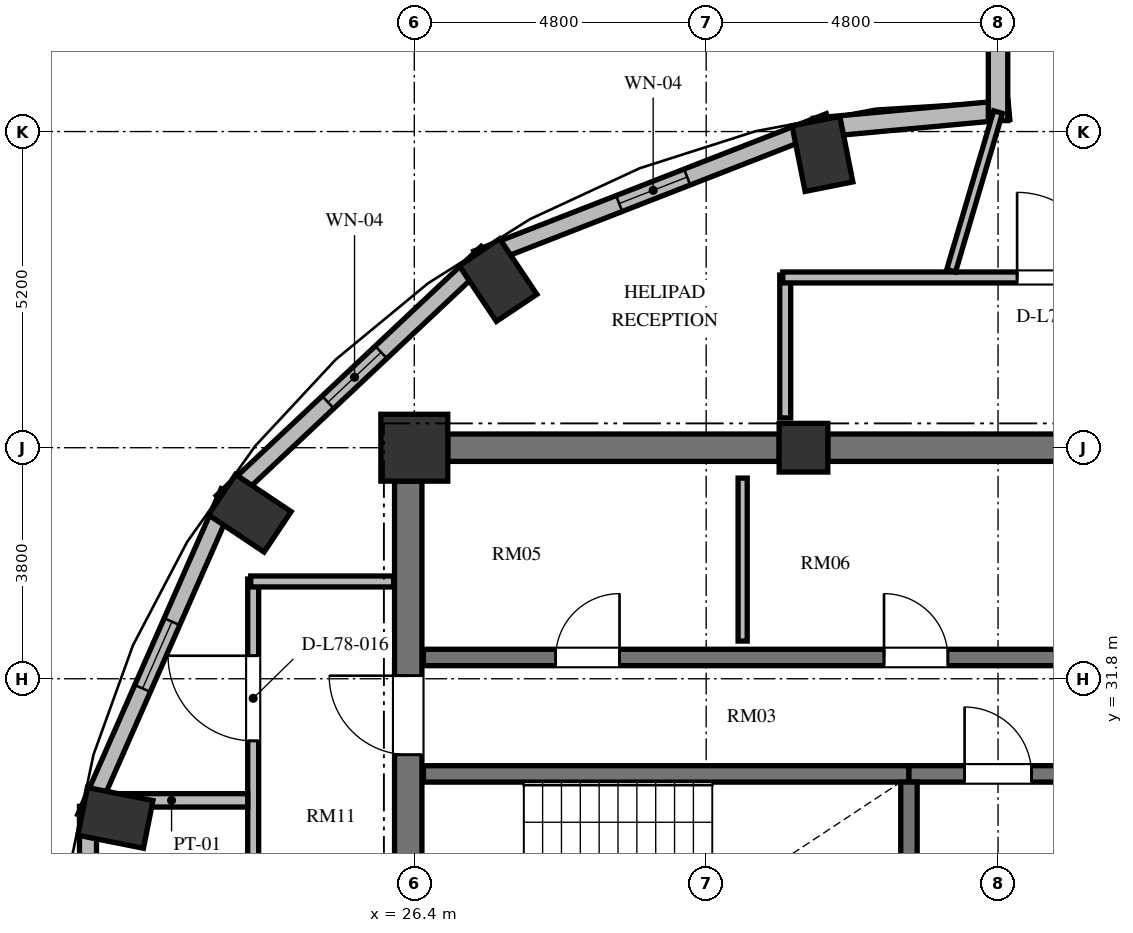
"""IFC4 building model, lengths in metres.
Left out: names, types, materials, properties, quantities, classifications, styles, units other than length and angle.
Written with IfcOpenShell. Run it as: python <this file> out.ifc"""

import sys

from ifc_helpers import new_model, si_unit, direction, frame, frame_2d, origin, origin_2d, place, context, subcontext, project, spatial, rectangle, extrude, element, fill, save


model = new_model("IFC4")
c1 = context("Model", 3, precision=1e-05, world=origin(), true_north=direction((0.0, 1.0)))
c2 = subcontext(c1, "Body", "Model", "MODEL_VIEW")
j1 = project(units=[si_unit("LENGTHUNIT", "METRE"), si_unit("PLANEANGLEUNIT", "RADIAN")], contexts=[c1])
p1 = place(None, origin())
s1 = spatial("IfcSite", under=j1, at=p1, CompositionType="ELEMENT")
p2 = place(p1, origin())
s2 = spatial("IfcBuilding", under=s1, at=p2, CompositionType="ELEMENT")
p3 = place(p2, frame((0.0, 0.0, 298.8)))
s3 = spatial("IfcBuildingStorey", under=s2, at=p3, CompositionType="ELEMENT", Elevation=298.8)
for number, where, z_axis, x_axis in (
    (1, (33.113, 40.433, 0.0), (0.0, 0.0, 1.0), (-0.195, 0.981, 0.0)),
    (2, (27.778, 38.357, 0.0), (0.0, 0.0, 1.0), (-0.556, 0.831, 0.0)),
    (3, (23.694, 34.522, 0.0), (0.0, 0.0, 1.0), (-0.831, 0.556, 0.0)),
    (4, (21.484, 29.512, 0.0), (0.0, 0.0, 1.0), (-0.981, 0.195, 0.0)),
):
    element("IfcColumn", number, at=place(p3, frame(where, z_axis=z_axis, x_axis=x_axis)), inside=s3, PredefinedType="COLUMN", context=c2, shape_type="SweptSolid", body=[
        extrude(rectangle(XDim=1.1, YDim=0.8, at=origin_2d()), origin(), (0.0, 0.0, 1.0), 3.648),
    ])
p4 = place(p3, frame((32.8, 35.6, 0.0), z_axis=(0.0, 0.0, 1.0), x_axis=(1.0, 0.0, 0.0)))
e5 = element("IfcColumn", 5, at=p4, inside=s3, PredefinedType="COLUMN", context=c2, shape_type="SweptSolid", body=[
    extrude(rectangle(XDim=0.8, YDim=0.8, at=origin_2d()), origin(), (0.0, 0.0, 1.0), 3.648),
])
p5 = place(p3, frame((26.4, 35.6, 0.0), z_axis=(0.0, 0.0, 1.0), x_axis=(1.0, 0.0, 0.0)))
e6 = element("IfcColumn", 6, at=p5, inside=s3, PredefinedType="COLUMN", context=c2, shape_type="SweptSolid", body=[
    extrude(rectangle(XDim=1.1, YDim=1.1, at=origin_2d()), origin(), (0.0, 0.0, 1.0), 3.648),
])
p6 = place(p3, frame((26.3, 20.95, 0.0), z_axis=(0.0, 0.0, 1.0), x_axis=(0.0, 1.0, 0.0)))
e7 = element("IfcWall", 7, at=p6, inside=s3, PredefinedType="SHEAR", context=c2, shape_type="SweptSolid", body=[
    extrude(rectangle(XDim=14.1, YDim=0.45, at=frame_2d((7.05, 0.0))), origin(), (0.0, 0.0, 1.0), 3.648),
])
p7 = place(p6, frame((6.5, 0.0, 0.0)))
e8 = element("IfcOpeningElement", 8, at=p7, cuts=e7, PredefinedType="OPENING", context=c2, shape_type="SweptSolid", body=[
    extrude(rectangle(XDim=1.2, YDim=2.15, at=frame_2d((0.6, 1.075))), frame((0.0, 0.235, 0.0), z_axis=(0.0, -1.0, 0.0), x_axis=(1.0, 0.0, 0.0)), (0.0, 0.0, 1.0), 0.47),
])
p8 = place(p6, frame((9.6, 0.0, 0.0)))
e9 = element("IfcOpeningElement", 9, at=p8, cuts=e7, PredefinedType="OPENING", context=c2, shape_type="SweptSolid", body=[
    extrude(rectangle(XDim=1.3, YDim=2.2, at=frame_2d((0.65, 1.1))), frame((0.0, 0.235, 0.0), z_axis=(0.0, -1.0, 0.0), x_axis=(1.0, 0.0, 0.0)), (0.0, 0.0, 1.0), 0.47),
])
p9 = place(p6, frame((3.26, 0.0, 0.0)))
e10 = element("IfcOpeningElement", 10, at=p9, cuts=e7, PredefinedType="OPENING", context=c2, shape_type="SweptSolid", body=[
    extrude(rectangle(XDim=1.3, YDim=2.2, at=frame_2d((0.65, 1.1))), frame((0.0, 0.235, 0.0), z_axis=(0.0, -1.0, 0.0), x_axis=(1.0, 0.0, 0.0)), (0.0, 0.0, 1.0), 0.47),
])
p10 = place(p3, frame((26.95, 35.6, 0.0), z_axis=(0.0, 0.0, 1.0), x_axis=(1.0, 0.0, 0.0)))
e11 = element("IfcWall", 11, at=p10, inside=s3, PredefinedType="SHEAR", context=c2, shape_type="SweptSolid", body=[
    extrude(rectangle(XDim=5.45, YDim=0.45, at=frame_2d((2.725, 0.0))), origin(), (0.0, 0.0, 1.0), 3.648),
])
p11 = place(p3, frame((33.2, 35.6, 0.0), z_axis=(0.0, 0.0, 1.0), x_axis=(1.0, 0.0, 0.0)))
e12 = element("IfcWall", 12, at=p11, inside=s3, PredefinedType="SHEAR", context=c2, shape_type="SweptSolid", body=[
    extrude(rectangle(XDim=5.6, YDim=0.45, at=frame_2d((2.8, 0.0))), origin(), (0.0, 0.0, 1.0), 3.648),
])
p12 = place(p3, frame((33.228, 40.964, 0.0), z_axis=(0.0, 0.0, 1.0), x_axis=(-0.931716550814, -0.36318627306, 0.0)))
e13 = element("IfcWall", 13, at=p12, inside=s3, PredefinedType="SOLIDWALL", context=c2, shape_type="SweptSolid", body=[
    extrude(rectangle(XDim=6.224, YDim=0.28, at=frame_2d((3.112, 0.0))), origin(), (0.0, 0.0, 1.0), 3.328),
])
p13 = place(p12, frame((2.512, 0.0, 0.85)))
e14 = element("IfcOpeningElement", 14, at=p13, cuts=e13, PredefinedType="OPENING", context=c2, shape_type="SweptSolid", body=[
    extrude(rectangle(XDim=1.2, YDim=1.8, at=frame_2d((0.6, 0.9))), frame((0.0, 0.15, 0.0), z_axis=(0.0, -1.0, 0.0), x_axis=(1.0, 0.0, 0.0)), (0.0, 0.0, 1.0), 0.3),
])
p14 = place(p3, frame((27.595, 38.808, 0.0), z_axis=(0.0, 0.0, 1.0), x_axis=(-0.728251519923, -0.685309947199, 0.0)))
e15 = element("IfcWall", 15, at=p14, inside=s3, PredefinedType="SOLIDWALL", context=c2, shape_type="SweptSolid", body=[
    extrude(rectangle(XDim=5.981, YDim=0.28, at=frame_2d((2.99, 0.0))), origin(), (0.0, 0.0, 1.0), 3.328),
])
p15 = place(p14, frame((2.391, 0.0, 0.85)))
e16 = element("IfcOpeningElement", 16, at=p15, cuts=e15, PredefinedType="OPENING", context=c2, shape_type="SweptSolid", body=[
    extrude(rectangle(XDim=1.2, YDim=1.8, at=frame_2d((0.6, 0.9))), frame((0.0, 0.15, 0.0), z_axis=(0.0, -1.0, 0.0), x_axis=(1.0, 0.0, 0.0)), (0.0, 0.0, 1.0), 0.3),
])
p16 = place(p3, frame((23.352, 34.869, 0.0), z_axis=(0.0, 0.0, 1.0), x_axis=(-0.402882523888, -0.915251698685, 0.0)))
e17 = element("IfcWall", 17, at=p16, inside=s3, PredefinedType="SOLIDWALL", context=c2, shape_type="SweptSolid", body=[
    extrude(rectangle(XDim=5.856, YDim=0.28, at=frame_2d((2.928, 0.0))), origin(), (0.0, 0.0, 1.0), 3.328),
])
p17 = place(p16, frame((2.328, 0.0, 0.85)))
e18 = element("IfcOpeningElement", 18, at=p17, cuts=e17, PredefinedType="OPENING", context=c2, shape_type="SweptSolid", body=[
    extrude(rectangle(XDim=1.2, YDim=1.8, at=frame_2d((0.6, 0.9))), frame((0.0, 0.15, 0.0), z_axis=(0.0, -1.0, 0.0), x_axis=(1.0, 0.0, 0.0)), (0.0, 0.0, 1.0), 0.3),
])
p18 = place(p3, frame((21.033, 29.701, 0.0), z_axis=(0.0, 0.0, 1.0), x_axis=(0.0, -1.0, 0.0)))
e19 = element("IfcWall", 19, at=p18, inside=s3, PredefinedType="SOLIDWALL", context=c2, shape_type="SweptSolid", body=[
    extrude(rectangle(XDim=5.803, YDim=0.28, at=frame_2d((2.901, 0.0))), origin(), (0.0, 0.0, 1.0), 3.328),
])
p19 = place(p18, frame((2.302, 0.0, 0.85)))
e20 = element("IfcOpeningElement", 20, at=p19, cuts=e19, PredefinedType="OPENING", context=c2, shape_type="SweptSolid", body=[
    extrude(rectangle(XDim=1.2, YDim=1.8, at=frame_2d((0.6, 0.9))), frame((0.0, 0.15, 0.0), z_axis=(0.0, -1.0, 0.0), x_axis=(1.0, 0.0, 0.0)), (0.0, 0.0, 1.0), 0.3),
])
p20 = place(p3, frame((36.179, 41.156, 0.0), z_axis=(0.0, 0.0, 1.0), x_axis=(-0.995736155144, -0.092247001792, 0.0)))
e21 = element("IfcWall", 21, at=p20, inside=s3, PredefinedType="SOLIDWALL", context=c2, shape_type="SweptSolid", body=[
    extrude(rectangle(XDim=3.216, YDim=0.32, at=frame_2d((1.608, 0.0))), origin(), (0.0, 0.0, 1.0), 2.413),
])
p21 = place(p3, frame((36.0, 45.5, 0.0), z_axis=(0.0, 0.0, 1.0), x_axis=(0.0, -1.0, 0.0)))
e22 = element("IfcWall", 22, at=p21, inside=s3, PredefinedType="SOLIDWALL", context=c2, shape_type="SweptSolid", body=[
    extrude(rectangle(XDim=4.52, YDim=0.32, at=frame_2d((2.26, 0.0))), origin(), (0.0, 0.0, 1.0), 3.328),
])
p22 = place(p3, frame((26.55, 30.235, 0.0), z_axis=(0.0, 0.0, 1.0), x_axis=(1.0, 0.0, 0.0)))
e23 = element("IfcWall", 23, at=p22, inside=s3, PredefinedType="SHEAR", context=c2, shape_type="SweptSolid", body=[
    extrude(rectangle(XDim=7.985, YDim=0.27, at=frame_2d((3.992, 0.0))), origin(), (0.0, 0.0, 1.0), 3.648),
])
p23 = place(p3, frame((34.535, 30.235, 0.0), z_axis=(0.0, 0.0, 1.0), x_axis=(1.0, 0.0, 0.0)))
e24 = element("IfcWall", 24, at=p23, inside=s3, PredefinedType="SHEAR", context=c2, shape_type="SweptSolid", body=[
    extrude(rectangle(XDim=2.93, YDim=0.27, at=frame_2d((1.465, 0.0))), origin(), (0.0, 0.0, 1.0), 3.648),
])
p24 = place(p23, frame((0.915, 0.0, 0.0)))
e25 = element("IfcOpeningElement", 25, at=p24, cuts=e24, PredefinedType="OPENING", context=c2, shape_type="SweptSolid", body=[
    extrude(rectangle(XDim=1.1, YDim=2.15, at=frame_2d((0.55, 1.075))), frame((0.0, 0.145, 0.0), z_axis=(0.0, -1.0, 0.0), x_axis=(1.0, 0.0, 0.0)), (0.0, 0.0, 1.0), 0.29),
])
p25 = place(p3, frame((34.535, 26.02, 0.0), z_axis=(0.0, 0.0, 1.0), x_axis=(0.0, 1.0, 0.0)))
e26 = element("IfcWall", 26, at=p25, inside=s3, PredefinedType="SHEAR", context=c2, shape_type="SweptSolid", body=[
    extrude(rectangle(XDim=4.08, YDim=0.27, at=frame_2d((2.04, 0.0))), origin(), (0.0, 0.0, 1.0), 3.648),
])
p26 = place(p3, frame((26.55, 32.15, 0.0), z_axis=(0.0, 0.0, 1.0), x_axis=(1.0, 0.0, 0.0)))
e27 = element("IfcWall", 27, at=p26, inside=s3, PredefinedType="SHEAR", context=c2, shape_type="SweptSolid", body=[
    extrude(rectangle(XDim=16.4, YDim=0.27, at=frame_2d((8.2, 0.0))), origin(), (0.0, 0.0, 1.0), 3.648),
])
p27 = place(p26, frame((2.175, 0.0, 0.0)))
e28 = element("IfcOpeningElement", 28, at=p27, cuts=e27, PredefinedType="OPENING", context=c2, shape_type="SweptSolid", body=[
    extrude(rectangle(XDim=1.05, YDim=2.15, at=frame_2d((0.525, 1.075))), frame((0.0, 0.145, 0.0), z_axis=(0.0, -1.0, 0.0), x_axis=(1.0, 0.0, 0.0)), (0.0, 0.0, 1.0), 0.29),
])
p28 = place(p26, frame((7.575, 0.0, 0.0)))
e29 = element("IfcOpeningElement", 29, at=p28, cuts=e27, PredefinedType="OPENING", context=c2, shape_type="SweptSolid", body=[
    extrude(rectangle(XDim=1.05, YDim=2.15, at=frame_2d((0.525, 1.075))), frame((0.0, 0.145, 0.0), z_axis=(0.0, -1.0, 0.0), x_axis=(1.0, 0.0, 0.0)), (0.0, 0.0, 1.0), 0.29),
])
p29 = place(p26, frame((11.9, 0.0, 0.0)))
e30 = element("IfcOpeningElement", 30, at=p29, cuts=e27, PredefinedType="OPENING", context=c2, shape_type="SweptSolid", body=[
    extrude(rectangle(XDim=1.1, YDim=2.2, at=frame_2d((0.55, 1.1))), frame((0.0, 0.145, 0.0), z_axis=(0.0, -1.0, 0.0), x_axis=(1.0, 0.0, 0.0)), (0.0, 0.0, 1.0), 0.29),
])
p30 = place(p26, frame((14.5, 0.0, 0.0)))
e31 = element("IfcOpeningElement", 31, at=p30, cuts=e27, PredefinedType="OPENING", context=c2, shape_type="SweptSolid", body=[
    extrude(rectangle(XDim=1.1, YDim=2.2, at=frame_2d((0.55, 1.1))), frame((0.0, 0.145, 0.0), z_axis=(0.0, -1.0, 0.0), x_axis=(1.0, 0.0, 0.0)), (0.0, 0.0, 1.0), 0.29),
])
p31 = place(p3, frame((31.8, 32.42, 0.0), z_axis=(0.0, 0.0, 1.0), x_axis=(0.0, 1.0, 0.0)))
e32 = element("IfcWall", 32, at=p31, inside=s3, PredefinedType="PARTITIONING", context=c2, shape_type="SweptSolid", body=[
    extrude(rectangle(XDim=2.68, YDim=0.15, at=frame_2d((1.34, 0.0))), origin(), (0.0, 0.0, 1.0), 3.328),
])
p32 = place(p3, frame((32.5, 36.09, 0.0), z_axis=(0.0, 0.0, 1.0), x_axis=(0.0, 1.0, 0.0)))
e33 = element("IfcWall", 33, at=p32, inside=s3, PredefinedType="PARTITIONING", context=c2, shape_type="SweptSolid", body=[
    extrude(rectangle(XDim=2.35, YDim=0.18, at=frame_2d((1.175, 0.0))), origin(), (0.0, 0.0, 1.0), 3.328),
])
p33 = place(p3, frame((32.46, 38.4, 0.0), z_axis=(0.0, 0.0, 1.0), x_axis=(1.0, 0.0, 0.0)))
e34 = element("IfcWall", 34, at=p33, inside=s3, PredefinedType="PARTITIONING", context=c2, shape_type="SweptSolid", body=[
    extrude(rectangle(XDim=19.879, YDim=0.18, at=frame_2d((9.939, 0.0))), origin(), (0.0, 0.0, 1.0), 3.013),
])
p34 = place(p33, frame((14.79, 0.0, 0.0)))
e35 = element("IfcOpeningElement", 35, at=p34, cuts=e34, PredefinedType="OPENING", context=c2, shape_type="SweptSolid", body=[
    extrude(rectangle(XDim=1.4, YDim=2.2, at=frame_2d((0.7, 1.1))), frame((0.0, 0.1, 0.0), z_axis=(0.0, -1.0, 0.0), x_axis=(1.0, 0.0, 0.0)), (0.0, 0.0, 1.0), 0.2),
])
p35 = place(p33, frame((11.215, 0.0, 0.0)))
e36 = element("IfcOpeningElement", 36, at=p35, cuts=e34, PredefinedType="OPENING", context=c2, shape_type="SweptSolid", body=[
    extrude(rectangle(XDim=1.05, YDim=2.15, at=frame_2d((0.525, 1.075))), frame((0.0, 0.1, 0.0), z_axis=(0.0, -1.0, 0.0), x_axis=(1.0, 0.0, 0.0)), (0.0, 0.0, 1.0), 0.2),
])
p36 = place(p33, frame((7.44, 0.0, 0.0)))
e37 = element("IfcOpeningElement", 37, at=p36, cuts=e34, PredefinedType="OPENING", context=c2, shape_type="SweptSolid", body=[
    extrude(rectangle(XDim=1.4, YDim=2.2, at=frame_2d((0.7, 1.1))), frame((0.0, 0.1, 0.0), z_axis=(0.0, -1.0, 0.0), x_axis=(1.0, 0.0, 0.0)), (0.0, 0.0, 1.0), 0.2),
])
p37 = place(p33, frame((3.854, 0.0, 0.0)))
e38 = element("IfcOpeningElement", 38, at=p37, cuts=e34, PredefinedType="OPENING", context=c2, shape_type="SweptSolid", body=[
    extrude(rectangle(XDim=1.4, YDim=2.2, at=frame_2d((0.7, 1.1))), frame((0.0, 0.1, 0.0), z_axis=(0.0, -1.0, 0.0), x_axis=(1.0, 0.0, 0.0)), (0.0, 0.0, 1.0), 0.2),
])
p38 = place(p3, frame((23.75, 22.16, 0.0), z_axis=(0.0, 0.0, 1.0), x_axis=(0.0, 1.0, 0.0)))
e39 = element("IfcWall", 39, at=p38, inside=s3, PredefinedType="PARTITIONING", context=c2, shape_type="SweptSolid", body=[
    extrude(rectangle(XDim=11.28, YDim=0.18, at=frame_2d((5.64, 0.0))), origin(), (0.0, 0.0, 1.0), 2.953),
])
p39 = place(p38, frame((4.772, 0.0, 0.0)))
e40 = element("IfcOpeningElement", 40, at=p39, cuts=e39, PredefinedType="OPENING", context=c2, shape_type="SweptSolid", body=[
    extrude(rectangle(XDim=1.4, YDim=2.2, at=frame_2d((0.7, 1.1))), frame((0.0, 0.1, 0.0), z_axis=(0.0, -1.0, 0.0), x_axis=(1.0, 0.0, 0.0)), (0.0, 0.0, 1.0), 0.2),
])
p40 = place(p38, frame((8.618, 0.0, 0.0)))
e41 = element("IfcOpeningElement", 41, at=p40, cuts=e39, PredefinedType="OPENING", context=c2, shape_type="SweptSolid", body=[
    extrude(rectangle(XDim=1.4, YDim=2.2, at=frame_2d((0.7, 1.1))), frame((0.0, 0.1, 0.0), z_axis=(0.0, -1.0, 0.0), x_axis=(1.0, 0.0, 0.0)), (0.0, 0.0, 1.0), 0.2),
])
p41 = place(p3, frame((23.71, 33.4, 0.0), z_axis=(0.0, 0.0, 1.0), x_axis=(1.0, 0.0, 0.0)))
e42 = element("IfcWall", 42, at=p41, inside=s3, PredefinedType="PARTITIONING", context=c2, shape_type="SweptSolid", body=[
    extrude(rectangle(XDim=2.35, YDim=0.18, at=frame_2d((1.175, 0.0))), origin(), (0.0, 0.0, 1.0), 3.328),
])
p42 = place(p3, frame((21.156, 29.8, 0.0), z_axis=(0.0, 0.0, 1.0), x_axis=(1.0, 0.0, 0.0)))
e43 = element("IfcWall", 43, at=p42, inside=s3, PredefinedType="PARTITIONING", context=c2, shape_type="SweptSolid", body=[
    extrude(rectangle(XDim=2.504, YDim=0.22, at=frame_2d((1.252, 0.0))), origin(), (0.0, 0.0, 1.0), 3.328),
])
p43 = place(p3, frame((35.229, 38.511, 0.0), z_axis=(0.0, 0.0, 1.0), x_axis=(0.28355057677, 0.958957282893, 0.0)))
e44 = element("IfcWall", 44, at=p43, inside=s3, PredefinedType="PARTITIONING", context=c2, shape_type="SweptSolid", body=[
    extrude(rectangle(XDim=2.721, YDim=0.15, at=frame_2d((1.36, 0.0))), origin(), (0.0, 0.0, 1.0), 3.328),
])
p44 = place(p13, origin())
e45 = element("IfcWindow", 45, at=p44, inside=s3, PartitioningType="SINGLE_PANEL", PredefinedType="WINDOW", context=c2, shape_type="SweptSolid", body=[
    extrude(rectangle(XDim=1.2, YDim=1.8, at=frame_2d((0.6, 0.9))), frame((0.0, 0.03, 0.0), z_axis=(0.0, -1.0, 0.0), x_axis=(1.0, 0.0, 0.0)), (0.0, 0.0, 1.0), 0.06),
])
fill(e14, e45)
p45 = place(p15, origin())
e46 = element("IfcWindow", 46, at=p45, inside=s3, PartitioningType="SINGLE_PANEL", PredefinedType="WINDOW", context=c2, shape_type="SweptSolid", body=[
    extrude(rectangle(XDim=1.2, YDim=1.8, at=frame_2d((0.6, 0.9))), frame((0.0, 0.03, 0.0), z_axis=(0.0, -1.0, 0.0), x_axis=(1.0, 0.0, 0.0)), (0.0, 0.0, 1.0), 0.06),
])
fill(e16, e46)
p46 = place(p17, origin())
e47 = element("IfcWindow", 47, at=p46, inside=s3, PartitioningType="SINGLE_PANEL", PredefinedType="WINDOW", context=c2, shape_type="SweptSolid", body=[
    extrude(rectangle(XDim=1.2, YDim=1.8, at=frame_2d((0.6, 0.9))), frame((0.0, 0.03, 0.0), z_axis=(0.0, -1.0, 0.0), x_axis=(1.0, 0.0, 0.0)), (0.0, 0.0, 1.0), 0.06),
])
fill(e18, e47)
p47 = place(p24, origin())
e48 = element("IfcDoor", 48, at=p47, inside=s3, OperationType="SINGLE_SWING_LEFT", PredefinedType="DOOR", context=c2, shape_type="SweptSolid", body=[
    extrude(rectangle(XDim=1.1, YDim=2.15, at=frame_2d((0.55, 1.075))), frame((0.0, 0.025, 0.0), z_axis=(0.0, -1.0, 0.0), x_axis=(1.0, 0.0, 0.0)), (0.0, 0.0, 1.0), 0.05),
])
fill(e25, e48)
p48 = place(p8, origin())
e49 = element("IfcDoor", 49, at=p48, inside=s3, OperationType="SINGLE_SWING_RIGHT", PredefinedType="DOOR", context=c2, shape_type="SweptSolid", body=[
    extrude(rectangle(XDim=1.3, YDim=2.2, at=frame_2d((0.65, 1.1))), frame((0.0, 0.025, 0.0), z_axis=(0.0, -1.0, 0.0), x_axis=(1.0, 0.0, 0.0)), (0.0, 0.0, 1.0), 0.05),
])
fill(e9, e49)
p49 = place(p27, origin())
e50 = element("IfcDoor", 50, at=p49, inside=s3, OperationType="SINGLE_SWING_RIGHT", PredefinedType="DOOR", context=c2, shape_type="SweptSolid", body=[
    extrude(rectangle(XDim=1.05, YDim=2.15, at=frame_2d((0.525, 1.075))), frame((0.0, 0.025, 0.0), z_axis=(0.0, -1.0, 0.0), x_axis=(1.0, 0.0, 0.0)), (0.0, 0.0, 1.0), 0.05),
])
fill(e28, e50)
p50 = place(p28, origin())
e51 = element("IfcDoor", 51, at=p50, inside=s3, OperationType="SINGLE_SWING_LEFT", PredefinedType="DOOR", context=c2, shape_type="SweptSolid", body=[
    extrude(rectangle(XDim=1.05, YDim=2.15, at=frame_2d((0.525, 1.075))), frame((0.0, 0.025, 0.0), z_axis=(0.0, -1.0, 0.0), x_axis=(1.0, 0.0, 0.0)), (0.0, 0.0, 1.0), 0.05),
])
fill(e29, e51)
p51 = place(p37, origin())
e52 = element("IfcDoor", 52, at=p51, inside=s3, OperationType="SINGLE_SWING_LEFT", PredefinedType="DOOR", context=c2, shape_type="SweptSolid", body=[
    extrude(rectangle(XDim=1.4, YDim=2.2, at=frame_2d((0.7, 1.1))), frame((0.0, 0.025, 0.0), z_axis=(0.0, -1.0, 0.0), x_axis=(1.0, 0.0, 0.0)), (0.0, 0.0, 1.0), 0.05),
])
fill(e38, e52)
p52 = place(p40, origin())
e53 = element("IfcDoor", 53, at=p52, inside=s3, OperationType="SINGLE_SWING_RIGHT", PredefinedType="DOOR", context=c2, shape_type="SweptSolid", body=[
    extrude(rectangle(XDim=1.4, YDim=2.2, at=frame_2d((0.7, 1.1))), frame((0.0, 0.025, 0.0), z_axis=(0.0, -1.0, 0.0), x_axis=(1.0, 0.0, 0.0)), (0.0, 0.0, 1.0), 0.05),
])
fill(e41, e53)
save(model, sys.argv[1])
